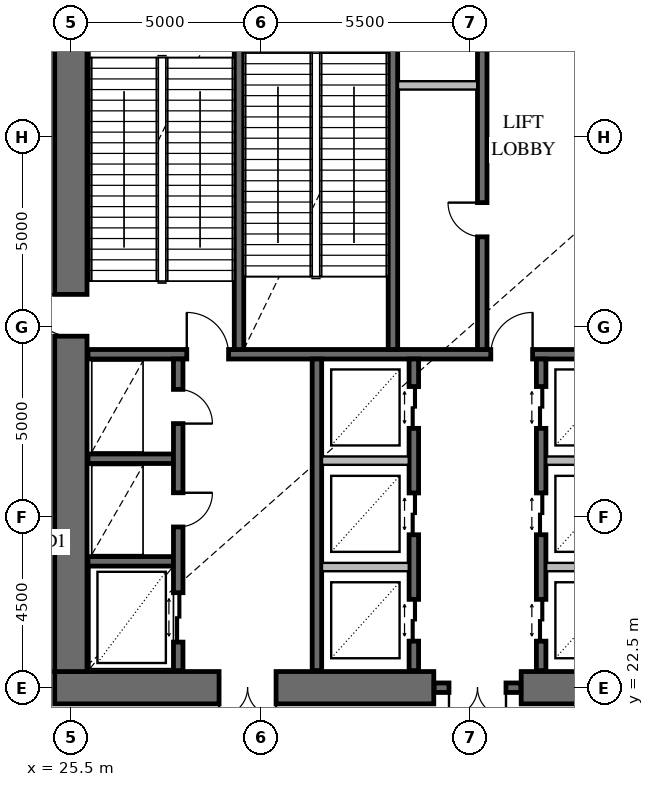
"""IFC4 building model, lengths in metres.
Left out: names, types, materials, properties, quantities, classifications, styles, units other than length and angle.
Written with IfcOpenShell. Run it as: python <this file> out.ifc"""

import sys

from ifc_helpers import new_model, si_unit, direction, frame, frame_2d, origin, place, context, subcontext, project, spatial, rectangle, extrude, element, fill, save


model = new_model("IFC4")
c1 = context("Model", 3, precision=1e-05, world=origin(), true_north=direction((0.0, 1.0)))
c2 = subcontext(c1, "Body", "Model", "MODEL_VIEW")
j1 = project(units=[si_unit("LENGTHUNIT", "METRE"), si_unit("PLANEANGLEUNIT", "RADIAN")], contexts=[c1])
p1 = place(None, origin())
s1 = spatial("IfcSite", under=j1, at=p1, CompositionType="ELEMENT")
p2 = place(p1, origin())
s2 = spatial("IfcBuilding", under=s1, at=p2, CompositionType="ELEMENT")
p3 = place(p2, origin())
s3 = spatial("IfcBuildingStorey", under=s2, at=p3, CompositionType="ELEMENT", Elevation=0.0)
p4 = place(p3, frame((25.075, 22.5, 0.0), z_axis=(0.0, 0.0, 1.0), x_axis=(1.0, 0.0, 0.0)))
e1 = element("IfcWall", 1, at=p4, inside=s3, PredefinedType="SHEAR", context=c2, shape_type="SweptSolid", body=[
    extrude(rectangle(XDim=9.975, YDim=0.85, at=frame_2d((4.988, 0.0))), origin(), (0.0, 0.0, 1.0), 7.8),
])
p5 = place(p4, frame((4.325, 0.0, 0.0)))
e2 = element("IfcOpeningElement", 2, at=p5, cuts=e1, PredefinedType="OPENING", context=c2, shape_type="SweptSolid", body=[
    extrude(rectangle(XDim=1.5, YDim=2.15, at=frame_2d((0.75, 1.075))), frame((0.0, 0.437, 0.0), z_axis=(0.0, -1.0, 0.0), x_axis=(1.0, 0.0, 0.0)), (0.0, 0.0, 1.0), 0.874),
])
p6 = place(p3, frame((37.35, 22.5, 0.0), z_axis=(0.0, 0.0, 1.0), x_axis=(1.0, 0.0, 0.0)))
e3 = element("IfcWall", 3, at=p6, inside=s3, PredefinedType="SHEAR", context=c2, shape_type="SweptSolid", body=[
    extrude(rectangle(XDim=9.575, YDim=0.85, at=frame_2d((4.788, 0.0))), origin(), (0.0, 0.0, 1.0), 7.8),
])
p7 = place(p6, frame((3.95, 0.0, 0.0)))
e4 = element("IfcOpeningElement", 4, at=p7, cuts=e3, PredefinedType="OPENING", context=c2, shape_type="SweptSolid", body=[
    extrude(rectangle(XDim=1.5, YDim=2.15, at=frame_2d((0.75, 1.075))), frame((0.0, 0.437, 0.0), z_axis=(0.0, -1.0, 0.0), x_axis=(1.0, 0.0, 0.0)), (0.0, 0.0, 1.0), 0.874),
])
p8 = place(p3, frame((25.5, 22.925, 0.0), z_axis=(0.0, 0.0, 1.0), x_axis=(0.0, 1.0, 0.0)))
e5 = element("IfcWall", 5, at=p8, inside=s3, PredefinedType="SHEAR", context=c2, shape_type="SweptSolid", body=[
    extrude(rectangle(XDim=18.15, YDim=0.85, at=frame_2d((9.075, 0.0))), origin(), (0.0, 0.0, 1.0), 7.8),
])
p9 = place(p8, frame((8.825, 0.0, 0.0)))
e6 = element("IfcOpeningElement", 6, at=p9, cuts=e5, PredefinedType="OPENING", context=c2, shape_type="SweptSolid", body=[
    extrude(rectangle(XDim=1.1, YDim=2.15, at=frame_2d((0.55, 1.075))), frame((0.0, 0.437, 0.0), z_axis=(0.0, -1.0, 0.0), x_axis=(1.0, 0.0, 0.0)), (0.0, 0.0, 1.0), 0.874),
])
p10 = place(p3, frame((25.858, 16.611, 0.0), z_axis=(0.0, 0.0, 1.0), x_axis=(-0.49999847728, 0.866026282926, 0.0)))
e7 = element("IfcWall", 7, at=p10, inside=s3, PredefinedType="SOLIDWALL", context=c2, shape_type="SweptSolid", body=[
    extrude(rectangle(XDim=16.512, YDim=0.3, at=frame_2d((8.256, 0.0))), origin(), (0.0, 0.0, 1.0), 5.95),
])
p11 = place(p10, frame((8.606, 0.0, 0.0)))
e8 = element("IfcOpeningElement", 8, at=p11, cuts=e7, PredefinedType="OPENING", context=c2, shape_type="SweptSolid", body=[
    extrude(rectangle(XDim=2.0, YDim=2.5, at=frame_2d((1.0, 1.25))), frame((0.0, 0.162, 0.0), z_axis=(0.0, -1.0, 0.0), x_axis=(1.0, 0.0, 0.0)), (0.0, 0.0, 1.0), 0.324),
])
p12 = place(p10, frame((7.056, 0.0, 4.5)))
e9 = element("IfcOpeningElement", 9, at=p12, cuts=e7, PredefinedType="OPENING", context=c2, shape_type="SweptSolid", body=[
    extrude(rectangle(XDim=2.4, YDim=1.6, at=frame_2d((1.2, 0.8))), frame((0.0, 0.162, 0.0), z_axis=(0.0, -1.0, 0.0), x_axis=(1.0, 0.0, 0.0)), (0.0, 0.0, 1.0), 0.324),
])
p13 = place(p3, frame((17.602, 33.089, 0.0), z_axis=(0.0, 0.0, 1.0), x_axis=(0.49999847728, 0.866026282926, 0.0)))
e10 = element("IfcWall", 10, at=p13, inside=s3, PredefinedType="SOLIDWALL", context=c2, shape_type="SweptSolid", body=[
    extrude(rectangle(XDim=16.512, YDim=0.3, at=frame_2d((8.256, 0.0))), origin(), (0.0, 0.0, 1.0), 5.95),
])
p14 = place(p13, frame((7.356, 0.0, 0.0)))
e11 = element("IfcOpeningElement", 11, at=p14, cuts=e10, PredefinedType="OPENING", context=c2, shape_type="SweptSolid", body=[
    extrude(rectangle(XDim=1.8, YDim=2.4, at=frame_2d((0.9, 1.2))), frame((0.0, 0.162, 0.0), z_axis=(0.0, -1.0, 0.0), x_axis=(1.0, 0.0, 0.0)), (0.0, 0.0, 1.0), 0.324),
])
p15 = place(p13, frame((7.056, 0.0, 4.5)))
e12 = element("IfcOpeningElement", 12, at=p15, cuts=e10, PredefinedType="OPENING", context=c2, shape_type="SweptSolid", body=[
    extrude(rectangle(XDim=2.4, YDim=1.6, at=frame_2d((1.2, 0.8))), frame((0.0, 0.162, 0.0), z_axis=(0.0, -1.0, 0.0), x_axis=(1.0, 0.0, 0.0)), (0.0, 0.0, 1.0), 0.324),
])
p16 = place(p3, frame((35.06, 22.5, 0.0), z_axis=(0.0, 0.0, 1.0), x_axis=(1.0, 0.0, 0.0)))
e13 = element("IfcWall", 13, at=p16, inside=s3, PredefinedType="SOLIDWALL", context=c2, shape_type="SweptSolid", body=[
    extrude(rectangle(XDim=2.28, YDim=0.25, at=frame_2d((1.14, 0.0))), origin(), (0.0, 0.0, 1.0), 7.8),
])
p17 = place(p16, frame((0.39, 0.0, 0.0)))
e14 = element("IfcOpeningElement", 14, at=p17, cuts=e13, PredefinedType="OPENING", context=c2, shape_type="SweptSolid", body=[
    extrude(rectangle(XDim=1.5, YDim=2.15, at=frame_2d((0.75, 1.075))), frame((0.0, 0.137, 0.0), z_axis=(0.0, -1.0, 0.0), x_axis=(1.0, 0.0, 0.0)), (0.0, 0.0, 1.0), 0.274),
])
p18 = place(p3, frame((25.95, 31.275, 0.0), z_axis=(0.0, 0.0, 1.0), x_axis=(1.0, 0.0, 0.0)))
e15 = element("IfcWall", 15, at=p18, inside=s3, PredefinedType="SOLIDWALL", context=c2, shape_type="SweptSolid", body=[
    extrude(rectangle(XDim=20.1, YDim=0.25, at=frame_2d((10.05, 0.0))), origin(), (0.0, 0.0, 1.0), 7.8),
])
p19 = place(p18, frame((2.6, 0.0, 0.0)))
e16 = element("IfcOpeningElement", 16, at=p19, cuts=e15, PredefinedType="OPENING", context=c2, shape_type="SweptSolid", body=[
    extrude(rectangle(XDim=1.1, YDim=2.15, at=frame_2d((0.55, 1.075))), frame((0.0, 0.137, 0.0), z_axis=(0.0, -1.0, 0.0), x_axis=(1.0, 0.0, 0.0)), (0.0, 0.0, 1.0), 0.274),
])
p20 = place(p18, frame((10.6, 0.0, 0.0)))
e17 = element("IfcOpeningElement", 17, at=p20, cuts=e15, PredefinedType="OPENING", context=c2, shape_type="SweptSolid", body=[
    extrude(rectangle(XDim=1.1, YDim=2.15, at=frame_2d((0.55, 1.075))), frame((0.0, 0.137, 0.0), z_axis=(0.0, -1.0, 0.0), x_axis=(1.0, 0.0, 0.0)), (0.0, 0.0, 1.0), 0.274),
])
p21 = place(p18, frame((16.35, 0.0, 0.0)))
e18 = element("IfcOpeningElement", 18, at=p21, cuts=e15, PredefinedType="OPENING", context=c2, shape_type="SweptSolid", body=[
    extrude(rectangle(XDim=1.1, YDim=2.15, at=frame_2d((0.55, 1.075))), frame((0.0, 0.137, 0.0), z_axis=(0.0, -1.0, 0.0), x_axis=(1.0, 0.0, 0.0)), (0.0, 0.0, 1.0), 0.274),
])
for number, where, z_axis, x_axis in (
    (19, (29.925, 31.4, 0.0), (0.0, 0.0, 1.0), (0.0, 1.0, 0.0)),
    (20, (33.975, 31.4, 0.0), (0.0, 0.0, 1.0), (0.0, 1.0, 0.0)),
):
    element("IfcWall", number, at=place(p3, frame(where, z_axis=z_axis, x_axis=x_axis)), inside=s3, PredefinedType="SOLIDWALL", context=c2, shape_type="SweptSolid", body=[
        extrude(rectangle(XDim=9.7, YDim=0.25, at=frame_2d((4.85, 0.0))), origin(), (0.0, 0.0, 1.0), 7.8),
    ])
p22 = place(p3, frame((36.325, 31.4, 0.0), z_axis=(0.0, 0.0, 1.0), x_axis=(0.0, 1.0, 0.0)))
e21 = element("IfcWall", 21, at=p22, inside=s3, PredefinedType="SOLIDWALL", context=c2, shape_type="SweptSolid", body=[
    extrude(rectangle(XDim=9.65, YDim=0.25, at=frame_2d((4.825, 0.0))), origin(), (0.0, 0.0, 1.0), 7.8),
])
p23 = place(p22, frame((2.965, 0.0, 0.0)))
e22 = element("IfcOpeningElement", 22, at=p23, cuts=e21, PredefinedType="OPENING", context=c2, shape_type="SweptSolid", body=[
    extrude(rectangle(XDim=0.9, YDim=2.1, at=frame_2d((0.45, 1.05))), frame((0.0, 0.137, 0.0), z_axis=(0.0, -1.0, 0.0), x_axis=(1.0, 0.0, 0.0)), (0.0, 0.0, 1.0), 0.274),
])
p24 = place(p22, frame((7.885, 0.0, 0.0)))
e23 = element("IfcOpeningElement", 23, at=p24, cuts=e21, PredefinedType="OPENING", context=c2, shape_type="SweptSolid", body=[
    extrude(rectangle(XDim=0.9, YDim=2.1, at=frame_2d((0.45, 1.05))), frame((0.0, 0.137, 0.0), z_axis=(0.0, -1.0, 0.0), x_axis=(1.0, 0.0, 0.0)), (0.0, 0.0, 1.0), 0.274),
])
for number, where, z_axis, x_axis in (
    (24, (25.95, 25.825, 0.0), (0.0, 0.0, 1.0), (1.0, 0.0, 0.0)),
    (25, (25.95, 28.525, 0.0), (0.0, 0.0, 1.0), (1.0, 0.0, 0.0)),
):
    element("IfcWall", number, at=place(p3, frame(where, z_axis=z_axis, x_axis=x_axis)), inside=s3, PredefinedType="SOLIDWALL", context=c2, shape_type="SweptSolid", body=[
        extrude(rectangle(XDim=2.25, YDim=0.25, at=frame_2d((1.125, 0.0))), origin(), (0.0, 0.0, 1.0), 7.8),
    ])
p25 = place(p3, frame((28.325, 22.95, 0.0), z_axis=(0.0, 0.0, 1.0), x_axis=(0.0, 1.0, 0.0)))
e26 = element("IfcWall", 26, at=p25, inside=s3, PredefinedType="SOLIDWALL", context=c2, shape_type="SweptSolid", body=[
    extrude(rectangle(XDim=8.2, YDim=0.25, at=frame_2d((4.1, 0.0))), origin(), (0.0, 0.0, 1.0), 7.8),
])
p26 = place(p25, frame((0.75, 0.0, 0.0)))
e27 = element("IfcOpeningElement", 27, at=p26, cuts=e26, PredefinedType="OPENING", context=c2, shape_type="SweptSolid", body=[
    extrude(rectangle(XDim=1.3, YDim=2.3, at=frame_2d((0.65, 1.15))), frame((0.0, 0.137, 0.0), z_axis=(0.0, -1.0, 0.0), x_axis=(1.0, 0.0, 0.0)), (0.0, 0.0, 1.0), 0.274),
])
p27 = place(p25, frame((3.78, 0.0, 0.0)))
e28 = element("IfcOpeningElement", 28, at=p27, cuts=e26, PredefinedType="OPENING", context=c2, shape_type="SweptSolid", body=[
    extrude(rectangle(XDim=0.9, YDim=2.1, at=frame_2d((0.45, 1.05))), frame((0.0, 0.137, 0.0), z_axis=(0.0, -1.0, 0.0), x_axis=(1.0, 0.0, 0.0)), (0.0, 0.0, 1.0), 0.274),
])
p28 = place(p25, frame((6.5, 0.0, 0.0)))
e29 = element("IfcOpeningElement", 29, at=p28, cuts=e26, PredefinedType="OPENING", context=c2, shape_type="SweptSolid", body=[
    extrude(rectangle(XDim=0.9, YDim=2.1, at=frame_2d((0.45, 1.05))), frame((0.0, 0.137, 0.0), z_axis=(0.0, -1.0, 0.0), x_axis=(1.0, 0.0, 0.0)), (0.0, 0.0, 1.0), 0.274),
])
p29 = place(p3, frame((31.975, 22.95, 0.0), z_axis=(0.0, 0.0, 1.0), x_axis=(0.0, 1.0, 0.0)))
e30 = element("IfcWall", 30, at=p29, inside=s3, PredefinedType="SOLIDWALL", context=c2, shape_type="SweptSolid", body=[
    extrude(rectangle(XDim=8.2, YDim=0.25, at=frame_2d((4.1, 0.0))), origin(), (0.0, 0.0, 1.0), 7.8),
])
p30 = place(p3, frame((34.525, 22.95, 0.0), z_axis=(0.0, 0.0, 1.0), x_axis=(0.0, 1.0, 0.0)))
e31 = element("IfcWall", 31, at=p30, inside=s3, PredefinedType="SOLIDWALL", context=c2, shape_type="SweptSolid", body=[
    extrude(rectangle(XDim=8.2, YDim=0.25, at=frame_2d((4.1, 0.0))), origin(), (0.0, 0.0, 1.0), 7.8),
])
p31 = place(p30, frame((0.775, 0.0, 0.0)))
e32 = element("IfcOpeningElement", 32, at=p31, cuts=e31, PredefinedType="OPENING", context=c2, shape_type="SweptSolid", body=[
    extrude(rectangle(XDim=1.1, YDim=2.2, at=frame_2d((0.55, 1.1))), frame((0.0, 0.137, 0.0), z_axis=(0.0, -1.0, 0.0), x_axis=(1.0, 0.0, 0.0)), (0.0, 0.0, 1.0), 0.274),
])
p32 = place(p30, frame((3.575, 0.0, 0.0)))
e33 = element("IfcOpeningElement", 33, at=p32, cuts=e31, PredefinedType="OPENING", context=c2, shape_type="SweptSolid", body=[
    extrude(rectangle(XDim=1.1, YDim=2.2, at=frame_2d((0.55, 1.1))), frame((0.0, 0.137, 0.0), z_axis=(0.0, -1.0, 0.0), x_axis=(1.0, 0.0, 0.0)), (0.0, 0.0, 1.0), 0.274),
])
p33 = place(p30, frame((6.375, 0.0, 0.0)))
e34 = element("IfcOpeningElement", 34, at=p33, cuts=e31, PredefinedType="OPENING", context=c2, shape_type="SweptSolid", body=[
    extrude(rectangle(XDim=1.1, YDim=2.2, at=frame_2d((0.55, 1.1))), frame((0.0, 0.137, 0.0), z_axis=(0.0, -1.0, 0.0), x_axis=(1.0, 0.0, 0.0)), (0.0, 0.0, 1.0), 0.274),
])
p34 = place(p3, frame((37.875, 22.95, 0.0), z_axis=(0.0, 0.0, 1.0), x_axis=(0.0, 1.0, 0.0)))
e35 = element("IfcWall", 35, at=p34, inside=s3, PredefinedType="SOLIDWALL", context=c2, shape_type="SweptSolid", body=[
    extrude(rectangle(XDim=8.2, YDim=0.25, at=frame_2d((4.1, 0.0))), origin(), (0.0, 0.0, 1.0), 7.8),
])
p35 = place(p34, frame((0.775, 0.0, 0.0)))
e36 = element("IfcOpeningElement", 36, at=p35, cuts=e35, PredefinedType="OPENING", context=c2, shape_type="SweptSolid", body=[
    extrude(rectangle(XDim=1.1, YDim=2.2, at=frame_2d((0.55, 1.1))), frame((0.0, 0.137, 0.0), z_axis=(0.0, -1.0, 0.0), x_axis=(1.0, 0.0, 0.0)), (0.0, 0.0, 1.0), 0.274),
])
p36 = place(p34, frame((3.575, 0.0, 0.0)))
e37 = element("IfcOpeningElement", 37, at=p36, cuts=e35, PredefinedType="OPENING", context=c2, shape_type="SweptSolid", body=[
    extrude(rectangle(XDim=1.1, YDim=2.2, at=frame_2d((0.55, 1.1))), frame((0.0, 0.137, 0.0), z_axis=(0.0, -1.0, 0.0), x_axis=(1.0, 0.0, 0.0)), (0.0, 0.0, 1.0), 0.274),
])
p37 = place(p34, frame((6.375, 0.0, 0.0)))
e38 = element("IfcOpeningElement", 38, at=p37, cuts=e35, PredefinedType="OPENING", context=c2, shape_type="SweptSolid", body=[
    extrude(rectangle(XDim=1.1, YDim=2.2, at=frame_2d((0.55, 1.1))), frame((0.0, 0.137, 0.0), z_axis=(0.0, -1.0, 0.0), x_axis=(1.0, 0.0, 0.0)), (0.0, 0.0, 1.0), 0.274),
])
p38 = place(p3, frame((34.108, 38.35, 0.0), z_axis=(0.0, 0.0, 1.0), x_axis=(1.0, 0.0, 0.0)))
e39 = element("IfcWall", 39, at=p38, inside=s3, PredefinedType="PARTITIONING", context=c2, shape_type="SweptSolid", body=[
    extrude(rectangle(XDim=2.084, YDim=0.22, at=frame_2d((1.042, 0.0))), origin(), (0.0, 0.0, 1.0), 7.35),
])
for number, where, z_axis, x_axis in (
    (40, (32.108, 25.675, 0.0), (0.0, 0.0, 1.0), (1.0, 0.0, 0.0)),
    (41, (32.108, 28.475, 0.0), (0.0, 0.0, 1.0), (1.0, 0.0, 0.0)),
):
    element("IfcWall", number, at=place(p3, frame(where, z_axis=z_axis, x_axis=x_axis)), inside=s3, PredefinedType="PARTITIONING", context=c2, shape_type="SweptSolid", body=[
        extrude(rectangle(XDim=2.284, YDim=0.22, at=frame_2d((1.142, 0.0))), origin(), (0.0, 0.0, 1.0), 7.35),
    ])
for number, where, z_axis, x_axis in (
    (42, (38.008, 25.675, 0.0), (0.0, 0.0, 1.0), (1.0, 0.0, 0.0)),
    (43, (38.008, 28.475, 0.0), (0.0, 0.0, 1.0), (1.0, 0.0, 0.0)),
):
    element("IfcWall", number, at=place(p3, frame(where, z_axis=z_axis, x_axis=x_axis)), inside=s3, PredefinedType="PARTITIONING", context=c2, shape_type="SweptSolid", body=[
        extrude(rectangle(XDim=2.284, YDim=0.22, at=frame_2d((1.142, 0.0))), origin(), (0.0, 0.0, 1.0), 7.35),
    ])
p39 = place(p9, origin())
e44 = element("IfcDoor", 44, at=p39, inside=s3, OperationType="SINGLE_SWING_RIGHT", PredefinedType="USERDEFINED", context=c2, shape_type="SweptSolid", body=[
    extrude(rectangle(XDim=1.1, YDim=2.15, at=frame_2d((0.55, 1.075))), frame((0.0, 0.025, 0.0), z_axis=(0.0, -1.0, 0.0), x_axis=(1.0, 0.0, 0.0)), (0.0, 0.0, 1.0), 0.05),
])
fill(e6, e44)
p40 = place(p5, frame((1.5, 0.0, 0.0), z_axis=(0.0, 0.0, 1.0), x_axis=(-1.0, 0.0, 0.0)))
e45 = element("IfcDoor", 45, at=p40, inside=s3, OperationType="DOUBLE_DOOR_SINGLE_SWING", PredefinedType="DOOR", context=c2, shape_type="SweptSolid", body=[
    extrude(rectangle(XDim=1.5, YDim=2.15, at=frame_2d((0.75, 1.075))), frame((0.0, 0.025, 0.0), z_axis=(0.0, -1.0, 0.0), x_axis=(1.0, 0.0, 0.0)), (0.0, 0.0, 1.0), 0.05),
])
fill(e2, e45)
p41 = place(p17, frame((1.5, 0.0, 0.0), z_axis=(0.0, 0.0, 1.0), x_axis=(-1.0, 0.0, 0.0)))
e46 = element("IfcDoor", 46, at=p41, inside=s3, OperationType="DOUBLE_DOOR_SINGLE_SWING", PredefinedType="DOOR", context=c2, shape_type="SweptSolid", body=[
    extrude(rectangle(XDim=1.5, YDim=2.15, at=frame_2d((0.75, 1.075))), frame((0.0, 0.025, 0.0), z_axis=(0.0, -1.0, 0.0), x_axis=(1.0, 0.0, 0.0)), (0.0, 0.0, 1.0), 0.05),
])
fill(e14, e46)
p42 = place(p19, origin())
e47 = element("IfcDoor", 47, at=p42, inside=s3, OperationType="SINGLE_SWING_LEFT", PredefinedType="USERDEFINED", context=c2, shape_type="SweptSolid", body=[
    extrude(rectangle(XDim=1.1, YDim=2.15, at=frame_2d((0.55, 1.075))), frame((0.0, 0.025, 0.0), z_axis=(0.0, -1.0, 0.0), x_axis=(1.0, 0.0, 0.0)), (0.0, 0.0, 1.0), 0.05),
])
fill(e16, e47)
p43 = place(p20, origin())
e48 = element("IfcDoor", 48, at=p43, inside=s3, OperationType="SINGLE_SWING_RIGHT", PredefinedType="USERDEFINED", context=c2, shape_type="SweptSolid", body=[
    extrude(rectangle(XDim=1.1, YDim=2.15, at=frame_2d((0.55, 1.075))), frame((0.0, 0.025, 0.0), z_axis=(0.0, -1.0, 0.0), x_axis=(1.0, 0.0, 0.0)), (0.0, 0.0, 1.0), 0.05),
])
fill(e17, e48)
p44 = place(p23, origin())
e49 = element("IfcDoor", 49, at=p44, inside=s3, OperationType="SINGLE_SWING_RIGHT", PredefinedType="DOOR", context=c2, shape_type="SweptSolid", body=[
    extrude(rectangle(XDim=0.9, YDim=2.1, at=frame_2d((0.45, 1.05))), frame((0.0, 0.025, 0.0), z_axis=(0.0, -1.0, 0.0), x_axis=(1.0, 0.0, 0.0)), (0.0, 0.0, 1.0), 0.05),
])
fill(e22, e49)
p45 = place(p26, frame((1.3, 0.0, 0.0), z_axis=(0.0, 0.0, 1.0), x_axis=(-1.0, 0.0, 0.0)))
e50 = element("IfcDoor", 50, at=p45, inside=s3, OperationType="DOUBLE_DOOR_SLIDING", PredefinedType="DOOR", context=c2, shape_type="SweptSolid", body=[
    extrude(rectangle(XDim=1.3, YDim=2.3, at=frame_2d((0.65, 1.15))), frame((0.0, 0.025, 0.0), z_axis=(0.0, -1.0, 0.0), x_axis=(1.0, 0.0, 0.0)), (0.0, 0.0, 1.0), 0.05),
])
fill(e27, e50)
p46 = place(p27, frame((0.9, 0.0, 0.0), z_axis=(0.0, 0.0, 1.0), x_axis=(-1.0, 0.0, 0.0)))
e51 = element("IfcDoor", 51, at=p46, inside=s3, OperationType="SINGLE_SWING_LEFT", PredefinedType="DOOR", context=c2, shape_type="SweptSolid", body=[
    extrude(rectangle(XDim=0.9, YDim=2.1, at=frame_2d((0.45, 1.05))), frame((0.0, 0.025, 0.0), z_axis=(0.0, -1.0, 0.0), x_axis=(1.0, 0.0, 0.0)), (0.0, 0.0, 1.0), 0.05),
])
fill(e28, e51)
p47 = place(p28, frame((0.9, 0.0, 0.0), z_axis=(0.0, 0.0, 1.0), x_axis=(-1.0, 0.0, 0.0)))
e52 = element("IfcDoor", 52, at=p47, inside=s3, OperationType="SINGLE_SWING_RIGHT", PredefinedType="DOOR", context=c2, shape_type="SweptSolid", body=[
    extrude(rectangle(XDim=0.9, YDim=2.1, at=frame_2d((0.45, 1.05))), frame((0.0, 0.025, 0.0), z_axis=(0.0, -1.0, 0.0), x_axis=(1.0, 0.0, 0.0)), (0.0, 0.0, 1.0), 0.05),
])
fill(e29, e52)
p48 = place(p31, frame((1.1, 0.0, 0.0), z_axis=(0.0, 0.0, 1.0), x_axis=(-1.0, 0.0, 0.0)))
e53 = element("IfcDoor", 53, at=p48, inside=s3, OperationType="DOUBLE_DOOR_SLIDING", PredefinedType="DOOR", context=c2, shape_type="SweptSolid", body=[
    extrude(rectangle(XDim=1.1, YDim=2.2, at=frame_2d((0.55, 1.1))), frame((0.0, 0.025, 0.0), z_axis=(0.0, -1.0, 0.0), x_axis=(1.0, 0.0, 0.0)), (0.0, 0.0, 1.0), 0.05),
])
fill(e32, e53)
p49 = place(p32, frame((1.1, 0.0, 0.0), z_axis=(0.0, 0.0, 1.0), x_axis=(-1.0, 0.0, 0.0)))
e54 = element("IfcDoor", 54, at=p49, inside=s3, OperationType="DOUBLE_DOOR_SLIDING", PredefinedType="DOOR", context=c2, shape_type="SweptSolid", body=[
    extrude(rectangle(XDim=1.1, YDim=2.2, at=frame_2d((0.55, 1.1))), frame((0.0, 0.025, 0.0), z_axis=(0.0, -1.0, 0.0), x_axis=(1.0, 0.0, 0.0)), (0.0, 0.0, 1.0), 0.05),
])
fill(e33, e54)
p50 = place(p33, frame((1.1, 0.0, 0.0), z_axis=(0.0, 0.0, 1.0), x_axis=(-1.0, 0.0, 0.0)))
e55 = element("IfcDoor", 55, at=p50, inside=s3, OperationType="DOUBLE_DOOR_SLIDING", PredefinedType="DOOR", context=c2, shape_type="SweptSolid", body=[
    extrude(rectangle(XDim=1.1, YDim=2.2, at=frame_2d((0.55, 1.1))), frame((0.0, 0.025, 0.0), z_axis=(0.0, -1.0, 0.0), x_axis=(1.0, 0.0, 0.0)), (0.0, 0.0, 1.0), 0.05),
])
fill(e34, e55)
p51 = place(p35, origin())
e56 = element("IfcDoor", 56, at=p51, inside=s3, OperationType="DOUBLE_DOOR_SLIDING", PredefinedType="DOOR", context=c2, shape_type="SweptSolid", body=[
    extrude(rectangle(XDim=1.1, YDim=2.2, at=frame_2d((0.55, 1.1))), frame((0.0, 0.025, 0.0), z_axis=(0.0, -1.0, 0.0), x_axis=(1.0, 0.0, 0.0)), (0.0, 0.0, 1.0), 0.05),
])
fill(e36, e56)
p52 = place(p36, origin())
e57 = element("IfcDoor", 57, at=p52, inside=s3, OperationType="DOUBLE_DOOR_SLIDING", PredefinedType="DOOR", context=c2, shape_type="SweptSolid", body=[
    extrude(rectangle(XDim=1.1, YDim=2.2, at=frame_2d((0.55, 1.1))), frame((0.0, 0.025, 0.0), z_axis=(0.0, -1.0, 0.0), x_axis=(1.0, 0.0, 0.0)), (0.0, 0.0, 1.0), 0.05),
])
fill(e37, e57)
p53 = place(p37, origin())
e58 = element("IfcDoor", 58, at=p53, inside=s3, OperationType="DOUBLE_DOOR_SLIDING", PredefinedType="DOOR", context=c2, shape_type="SweptSolid", body=[
    extrude(rectangle(XDim=1.1, YDim=2.2, at=frame_2d((0.55, 1.1))), frame((0.0, 0.025, 0.0), z_axis=(0.0, -1.0, 0.0), x_axis=(1.0, 0.0, 0.0)), (0.0, 0.0, 1.0), 0.05),
])
fill(e38, e58)
save(model, sys.argv[1])
